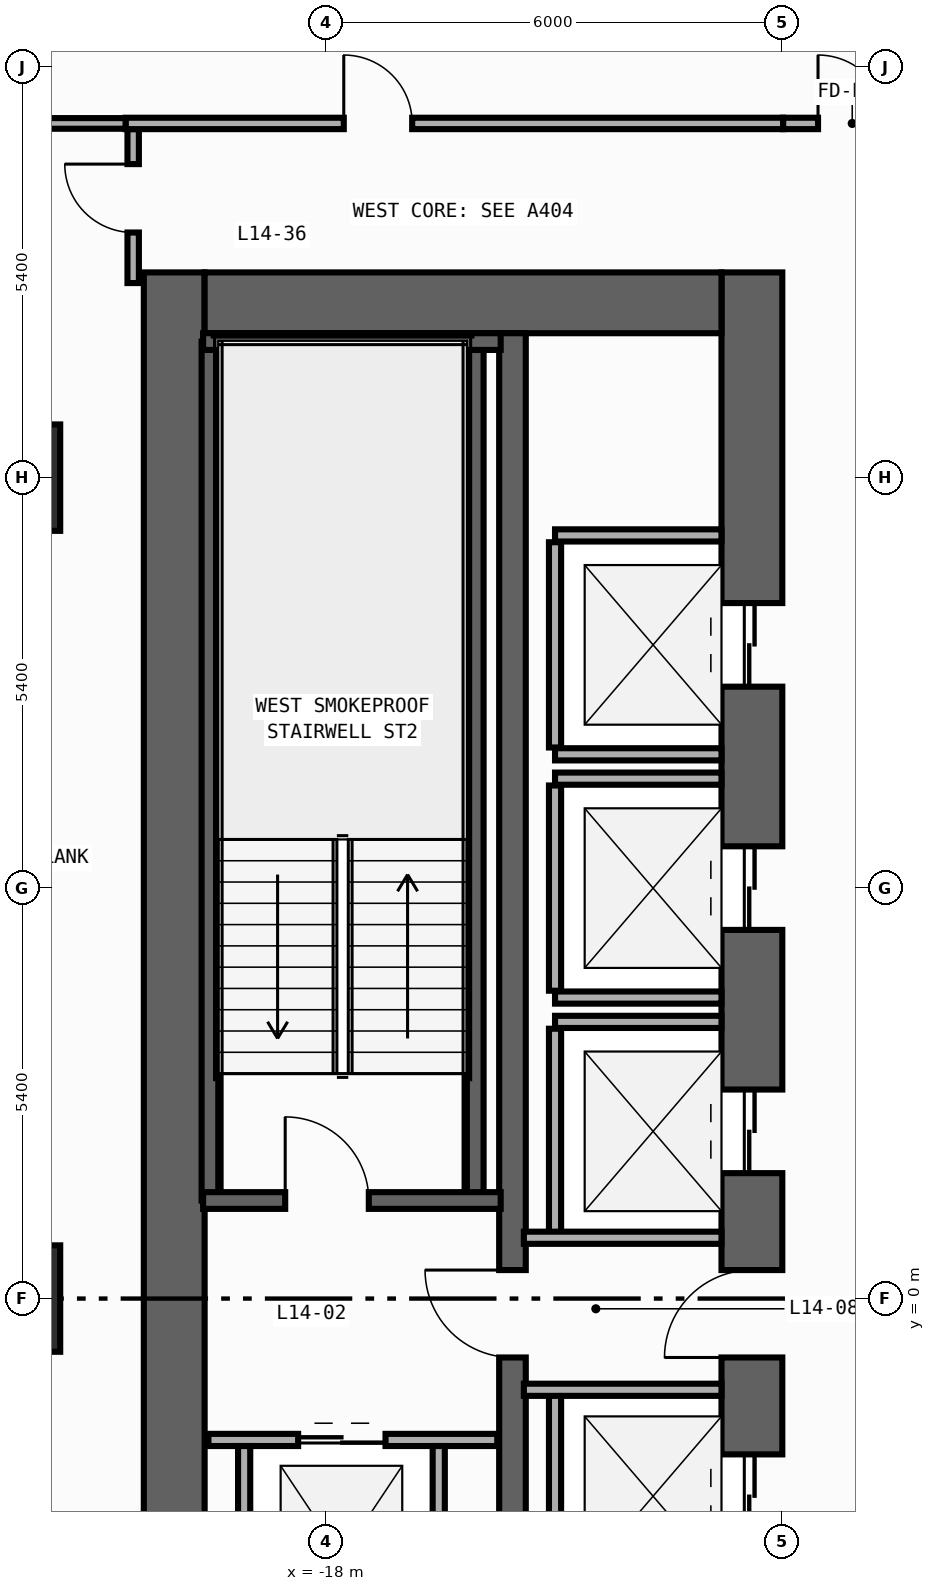
"""IFC4 building model, lengths in metres.
Left out: names, types, materials, properties, quantities, classifications, styles, units other than length and angle.
Written with IfcOpenShell. Run it as: python <this file> out.ifc"""

import sys

from ifc_helpers import new_model, si_unit, direction, frame, frame_2d, origin, origin_2d, place, context, subcontext, project, spatial, rectangle, extrude, element, fill, save


model = new_model("IFC4")
c1 = context("Model", 3, precision=1e-05, world=origin(), true_north=direction((0.0, 1.0)))
c2 = subcontext(c1, "Body", "Model", "MODEL_VIEW")
j1 = project(units=[si_unit("LENGTHUNIT", "METRE"), si_unit("PLANEANGLEUNIT", "RADIAN")], contexts=[c1])
p1 = place(None, origin())
s1 = spatial("IfcSite", under=j1, at=p1, CompositionType="ELEMENT")
p2 = place(p1, origin())
s2 = spatial("IfcBuilding", under=s1, at=p2, CompositionType="ELEMENT")
p3 = place(p2, frame((0.0, 0.0, 59.6)))
s3 = spatial("IfcBuildingStorey", under=s2, at=p3, CompositionType="ELEMENT", Elevation=59.6)
p4 = place(p3, frame((-20.0, -13.5, 0.0), z_axis=(0.0, 0.0, 1.0), x_axis=(0.0, 1.0, 0.0)))
e1 = element("IfcWall", 1, at=p4, inside=s3, PredefinedType="SHEAR", context=c2, shape_type="SweptSolid", body=[
    extrude(rectangle(XDim=27.0, YDim=0.8, at=frame_2d((13.5, 0.0))), origin(), (0.0, 0.0, 1.0), 3.94),
])
p5 = place(p3, frame((-12.4, -13.5, 0.0), z_axis=(0.0, 0.0, 1.0), x_axis=(0.0, 1.0, 0.0)))
e2 = element("IfcWall", 2, at=p5, inside=s3, PredefinedType="SHEAR", context=c2, shape_type="SweptSolid", body=[
    extrude(rectangle(XDim=27.0, YDim=0.8, at=frame_2d((13.5, 0.0))), origin(), (0.0, 0.0, 1.0), 3.94),
])
p6 = place(p5, frame((21.55, 0.0, 0.0)))
e3 = element("IfcOpeningElement", 3, at=p6, cuts=e2, PredefinedType="OPENING", context=c2, shape_type="SweptSolid", body=[
    extrude(rectangle(XDim=1.1, YDim=2.2, at=frame_2d((0.55, 1.1))), frame((0.0, 0.41, 0.0), z_axis=(0.0, -1.0, 0.0), x_axis=(1.0, 0.0, 0.0)), (0.0, 0.0, 1.0), 0.82),
])
p7 = place(p5, frame((18.35, 0.0, 0.0)))
e4 = element("IfcOpeningElement", 4, at=p7, cuts=e2, PredefinedType="OPENING", context=c2, shape_type="SweptSolid", body=[
    extrude(rectangle(XDim=1.1, YDim=2.2, at=frame_2d((0.55, 1.1))), frame((0.0, 0.41, 0.0), z_axis=(0.0, -1.0, 0.0), x_axis=(1.0, 0.0, 0.0)), (0.0, 0.0, 1.0), 0.82),
])
p8 = place(p5, frame((15.15, 0.0, 0.0)))
e5 = element("IfcOpeningElement", 5, at=p8, cuts=e2, PredefinedType="OPENING", context=c2, shape_type="SweptSolid", body=[
    extrude(rectangle(XDim=1.1, YDim=2.2, at=frame_2d((0.55, 1.1))), frame((0.0, 0.41, 0.0), z_axis=(0.0, -1.0, 0.0), x_axis=(1.0, 0.0, 0.0)), (0.0, 0.0, 1.0), 0.82),
])
p9 = place(p5, frame((10.35, 0.0, 0.0)))
e6 = element("IfcOpeningElement", 6, at=p9, cuts=e2, PredefinedType="OPENING", context=c2, shape_type="SweptSolid", body=[
    extrude(rectangle(XDim=1.1, YDim=2.2, at=frame_2d((0.55, 1.1))), frame((0.0, 0.41, 0.0), z_axis=(0.0, -1.0, 0.0), x_axis=(1.0, 0.0, 0.0)), (0.0, 0.0, 1.0), 0.82),
])
p10 = place(p5, frame((7.15, 0.0, 0.0)))
e7 = element("IfcOpeningElement", 7, at=p10, cuts=e2, PredefinedType="OPENING", context=c2, shape_type="SweptSolid", body=[
    extrude(rectangle(XDim=1.1, YDim=2.2, at=frame_2d((0.55, 1.1))), frame((0.0, 0.41, 0.0), z_axis=(0.0, -1.0, 0.0), x_axis=(1.0, 0.0, 0.0)), (0.0, 0.0, 1.0), 0.82),
])
p11 = place(p5, frame((3.95, 0.0, 0.0)))
e8 = element("IfcOpeningElement", 8, at=p11, cuts=e2, PredefinedType="OPENING", context=c2, shape_type="SweptSolid", body=[
    extrude(rectangle(XDim=1.1, YDim=2.2, at=frame_2d((0.55, 1.1))), frame((0.0, 0.41, 0.0), z_axis=(0.0, -1.0, 0.0), x_axis=(1.0, 0.0, 0.0)), (0.0, 0.0, 1.0), 0.82),
])
p12 = place(p5, frame((12.725, 0.0, 0.0)))
e9 = element("IfcOpeningElement", 9, at=p12, cuts=e2, PredefinedType="OPENING", context=c2, shape_type="SweptSolid", body=[
    extrude(rectangle(XDim=1.15, YDim=2.2, at=frame_2d((0.575, 1.1))), frame((0.0, 0.41, 0.0), z_axis=(0.0, -1.0, 0.0), x_axis=(1.0, 0.0, 0.0)), (0.0, 0.0, 1.0), 0.82),
])
p13 = place(p5, frame((1.625, 0.0, 0.0)))
e10 = element("IfcOpeningElement", 10, at=p13, cuts=e2, PredefinedType="OPENING", context=c2, shape_type="SweptSolid", body=[
    extrude(rectangle(XDim=0.85, YDim=2.1, at=frame_2d((0.425, 1.05))), frame((0.0, 0.41, 0.0), z_axis=(0.0, -1.0, 0.0), x_axis=(1.0, 0.0, 0.0)), (0.0, 0.0, 1.0), 0.82),
])
p14 = place(p3, frame((-19.6, 13.1, 0.0), z_axis=(0.0, 0.0, 1.0), x_axis=(1.0, 0.0, 0.0)))
e11 = element("IfcWall", 11, at=p14, inside=s3, PredefinedType="SHEAR", context=c2, shape_type="SweptSolid", body=[
    extrude(rectangle(XDim=6.8, YDim=0.8, at=frame_2d((3.4, 0.0))), origin(), (0.0, 0.0, 1.0), 3.94),
])
p15 = place(p3, frame((-15.55, -12.7, 0.0), z_axis=(0.0, 0.0, 1.0), x_axis=(0.0, 1.0, 0.0)))
e12 = element("IfcWall", 12, at=p15, inside=s3, PredefinedType="SHEAR", context=c2, shape_type="SweptSolid", body=[
    extrude(rectangle(XDim=25.4, YDim=0.35, at=frame_2d((12.7, 0.0))), origin(), (0.0, 0.0, 1.0), 3.94),
])
p16 = place(p15, frame((11.925, 0.0, 0.0)))
e13 = element("IfcOpeningElement", 13, at=p16, cuts=e12, PredefinedType="OPENING", context=c2, shape_type="SweptSolid", body=[
    extrude(rectangle(XDim=1.15, YDim=2.2, at=frame_2d((0.575, 1.1))), frame((0.0, 0.185, 0.0), z_axis=(0.0, -1.0, 0.0), x_axis=(1.0, 0.0, 0.0)), (0.0, 0.0, 1.0), 0.37),
])
p17 = place(p15, frame((0.825, 0.0, 0.0)))
e14 = element("IfcOpeningElement", 14, at=p17, cuts=e12, PredefinedType="OPENING", context=c2, shape_type="SweptSolid", body=[
    extrude(rectangle(XDim=0.85, YDim=2.1, at=frame_2d((0.425, 1.05))), frame((0.0, 0.185, 0.0), z_axis=(0.0, -1.0, 0.0), x_axis=(1.0, 0.0, 0.0)), (0.0, 0.0, 1.0), 0.37),
])
for number, where, z_axis, x_axis in (
    (15, (-16.04, 1.29, 0.0), (0.0, 0.0, 1.0), (0.0, 1.0, 0.0)),
    (16, (-19.53, 1.29, 0.0), (0.0, 0.0, 1.0), (0.0, 1.0, 0.0)),
):
    element("IfcWall", number, at=place(p3, frame(where, z_axis=z_axis, x_axis=x_axis)), inside=s3, PredefinedType="SHEAR", context=c2, shape_type="SweptSolid", body=[
        extrude(rectangle(XDim=11.3, YDim=0.22, at=frame_2d((5.65, 0.0))), origin(), (0.0, 0.0, 1.0), 3.94),
    ])
p18 = place(p3, frame((-19.62, 12.59, 0.0), z_axis=(0.0, 0.0, 1.0), x_axis=(1.0, 0.0, 0.0)))
e17 = element("IfcWall", 17, at=p18, inside=s3, PredefinedType="SHEAR", context=c2, shape_type="SweptSolid", body=[
    extrude(rectangle(XDim=3.915, YDim=0.22, at=frame_2d((1.958, 0.0))), origin(), (0.0, 0.0, 1.0), 3.94),
])
p19 = place(p3, frame((-19.62, 1.29, 0.0), z_axis=(0.0, 0.0, 1.0), x_axis=(1.0, 0.0, 0.0)))
e18 = element("IfcWall", 18, at=p19, inside=s3, PredefinedType="SHEAR", context=c2, shape_type="SweptSolid", body=[
    extrude(rectangle(XDim=3.915, YDim=0.22, at=frame_2d((1.958, 0.0))), origin(), (0.0, 0.0, 1.0), 3.94),
])
p20 = place(p19, frame((1.08, 0.0, 0.0)))
e19 = element("IfcOpeningElement", 19, at=p20, cuts=e18, PredefinedType="OPENING", context=c2, shape_type="SweptSolid", body=[
    extrude(rectangle(XDim=1.1, YDim=2.2, at=frame_2d((0.55, 1.1))), frame((0.0, 0.12, 0.0), z_axis=(0.0, -1.0, 0.0), x_axis=(1.0, 0.0, 0.0)), (0.0, 0.0, 1.0), 0.24),
])
for number, where, z_axis, x_axis in (
    (20, (-22.2, 0.0, 0.0), (0.0, 0.0, 1.0), (1.0, 0.0, 0.0)),
    (21, (-22.2, 10.8, 0.0), (0.0, 0.0, 1.0), (1.0, 0.0, 0.0)),
):
    element("IfcColumn", number, at=place(p3, frame(where, z_axis=z_axis, x_axis=x_axis)), inside=s3, PredefinedType="COLUMN", context=c2, shape_type="SweptSolid", body=[
        extrude(rectangle(XDim=1.4, YDim=1.4, at=origin_2d()), origin(), (0.0, 0.0, 1.0), 4.2),
    ])
for number, where, z_axis, x_axis in (
    (22, (-14.99, 7.16, 0.0), (0.0, 0.0, 1.0), (1.0, 0.0, 0.0)),
    (23, (-14.99, 10.04, 0.0), (0.0, 0.0, 1.0), (1.0, 0.0, 0.0)),
):
    element("IfcWall", number, at=place(p3, frame(where, z_axis=z_axis, x_axis=x_axis)), inside=s3, PredefinedType="STANDARD", context=c2, shape_type="SweptSolid", body=[
        extrude(rectangle(XDim=2.19, YDim=0.16, at=frame_2d((1.095, 0.0))), origin(), (0.0, 0.0, 1.0), 3.94),
    ])
p21 = place(p3, frame((-14.99, 7.25, 0.0), z_axis=(0.0, 0.0, 1.0), x_axis=(0.0, 1.0, 0.0)))
e24 = element("IfcWall", 24, at=p21, inside=s3, PredefinedType="STANDARD", context=c2, shape_type="SweptSolid", body=[
    extrude(rectangle(XDim=2.7, YDim=0.16, at=frame_2d((1.35, 0.0))), origin(), (0.0, 0.0, 1.0), 3.94),
])
for number, where, z_axis, x_axis in (
    (25, (-14.99, 3.96, 0.0), (0.0, 0.0, 1.0), (1.0, 0.0, 0.0)),
    (26, (-14.99, 6.84, 0.0), (0.0, 0.0, 1.0), (1.0, 0.0, 0.0)),
):
    element("IfcWall", number, at=place(p3, frame(where, z_axis=z_axis, x_axis=x_axis)), inside=s3, PredefinedType="STANDARD", context=c2, shape_type="SweptSolid", body=[
        extrude(rectangle(XDim=2.19, YDim=0.16, at=frame_2d((1.095, 0.0))), origin(), (0.0, 0.0, 1.0), 3.94),
    ])
p22 = place(p3, frame((-14.99, 4.05, 0.0), z_axis=(0.0, 0.0, 1.0), x_axis=(0.0, 1.0, 0.0)))
e27 = element("IfcWall", 27, at=p22, inside=s3, PredefinedType="STANDARD", context=c2, shape_type="SweptSolid", body=[
    extrude(rectangle(XDim=2.7, YDim=0.16, at=frame_2d((1.35, 0.0))), origin(), (0.0, 0.0, 1.0), 3.94),
])
p23 = place(p3, frame((-14.99, 3.64, 0.0), z_axis=(0.0, 0.0, 1.0), x_axis=(1.0, 0.0, 0.0)))
e28 = element("IfcWall", 28, at=p23, inside=s3, PredefinedType="STANDARD", context=c2, shape_type="SweptSolid", body=[
    extrude(rectangle(XDim=2.19, YDim=0.16, at=frame_2d((1.095, 0.0))), origin(), (0.0, 0.0, 1.0), 3.94),
])
for number, where, z_axis, x_axis in (
    (29, (-14.99, 0.85, 0.0), (0.0, 0.0, 1.0), (0.0, 1.0, 0.0)),
    (30, (-14.99, -3.95, 0.0), (0.0, 0.0, 1.0), (0.0, 1.0, 0.0)),
):
    element("IfcWall", number, at=place(p3, frame(where, z_axis=z_axis, x_axis=x_axis)), inside=s3, PredefinedType="STANDARD", context=c2, shape_type="SweptSolid", body=[
        extrude(rectangle(XDim=2.7, YDim=0.16, at=frame_2d((1.35, 0.0))), origin(), (0.0, 0.0, 1.0), 3.94),
    ])
p24 = place(p3, frame((-19.55, -1.86, 0.0), z_axis=(0.0, 0.0, 1.0), x_axis=(1.0, 0.0, 0.0)))
e31 = element("IfcWall", 31, at=p24, inside=s3, PredefinedType="STANDARD", context=c2, shape_type="SweptSolid", body=[
    extrude(rectangle(XDim=3.8, YDim=0.16, at=frame_2d((1.9, 0.0))), origin(), (0.0, 0.0, 1.0), 3.94),
])
p25 = place(p24, frame((1.18, 0.0, 0.0)))
e32 = element("IfcOpeningElement", 32, at=p25, cuts=e31, PredefinedType="OPENING", context=c2, shape_type="SweptSolid", body=[
    extrude(rectangle(XDim=1.15, YDim=2.2, at=frame_2d((0.575, 1.1))), frame((0.0, 0.09, 0.0), z_axis=(0.0, -1.0, 0.0), x_axis=(1.0, 0.0, 0.0)), (0.0, 0.0, 1.0), 0.18),
])
for number, where, z_axis, x_axis in (
    (33, (-19.08, -4.9, 0.0), (0.0, 0.0, 1.0), (0.0, 1.0, 0.0)),
    (34, (-16.52, -4.9, 0.0), (0.0, 0.0, 1.0), (0.0, 1.0, 0.0)),
):
    element("IfcWall", number, at=place(p3, frame(where, z_axis=z_axis, x_axis=x_axis)), inside=s3, PredefinedType="STANDARD", context=c2, shape_type="SweptSolid", body=[
        extrude(rectangle(XDim=2.96, YDim=0.16, at=frame_2d((1.48, 0.0))), origin(), (0.0, 0.0, 1.0), 3.94),
    ])
for number, where, z_axis, x_axis in (
    (35, (-15.4, 0.8, 0.0), (0.0, 0.0, 1.0), (1.0, 0.0, 0.0)),
    (36, (-15.4, -1.2, 0.0), (0.0, 0.0, 1.0), (1.0, 0.0, 0.0)),
):
    element("IfcWall", number, at=place(p3, frame(where, z_axis=z_axis, x_axis=x_axis)), inside=s3, PredefinedType="STANDARD", context=c2, shape_type="SweptSolid", body=[
        extrude(rectangle(XDim=2.6, YDim=0.16, at=frame_2d((1.3, 0.0))), origin(), (0.0, 0.0, 1.0), 3.94),
    ])
p26 = place(p3, frame((-11.99, 15.46, 0.0), z_axis=(0.0, 0.0, 1.0), x_axis=(1.0, 0.0, 0.0)))
e37 = element("IfcWall", 37, at=p26, inside=s3, PredefinedType="PARTITIONING", context=c2, shape_type="SweptSolid", body=[
    extrude(rectangle(XDim=1.98, YDim=0.15, at=frame_2d((0.99, 0.0))), origin(), (0.0, 0.0, 1.0), 3.94),
])
p27 = place(p26, frame((0.46, 0.0, 0.0)))
e38 = element("IfcOpeningElement", 38, at=p27, cuts=e37, PredefinedType="OPENING", context=c2, shape_type="SweptSolid", body=[
    extrude(rectangle(XDim=0.9, YDim=2.15, at=frame_2d((0.45, 1.075))), frame((0.0, 0.085, 0.0), z_axis=(0.0, -1.0, 0.0), x_axis=(1.0, 0.0, 0.0)), (0.0, 0.0, 1.0), 0.17),
])
p28 = place(p3, frame((-20.54, 13.36, 0.0), z_axis=(0.0, 0.0, 1.0), x_axis=(0.0, 1.0, 0.0)))
e39 = element("IfcWall", 39, at=p28, inside=s3, PredefinedType="PARTITIONING", context=c2, shape_type="SweptSolid", body=[
    extrude(rectangle(XDim=2.025, YDim=0.15, at=frame_2d((1.012, 0.0))), origin(), (0.0, 0.0, 1.0), 3.94),
])
p29 = place(p28, frame((0.665, 0.0, 0.0)))
e40 = element("IfcOpeningElement", 40, at=p29, cuts=e39, PredefinedType="OPENING", context=c2, shape_type="SweptSolid", body=[
    extrude(rectangle(XDim=0.9, YDim=2.15, at=frame_2d((0.45, 1.075))), frame((0.0, 0.085, 0.0), z_axis=(0.0, -1.0, 0.0), x_axis=(1.0, 0.0, 0.0)), (0.0, 0.0, 1.0), 0.17),
])
p30 = place(p3, frame((-20.64, 15.46, 0.0), z_axis=(0.0, 0.0, 1.0), x_axis=(1.0, 0.0, 0.0)))
e41 = element("IfcWall", 41, at=p30, inside=s3, PredefinedType="PARTITIONING", context=c2, shape_type="SweptSolid", body=[
    extrude(rectangle(XDim=8.65, YDim=0.15, at=frame_2d((4.325, 0.0))), origin(), (0.0, 0.0, 1.0), 3.94),
])
p31 = place(p30, frame((2.871, 0.0, 0.0)))
e42 = element("IfcOpeningElement", 42, at=p31, cuts=e41, PredefinedType="OPENING", context=c2, shape_type="SweptSolid", body=[
    extrude(rectangle(XDim=0.9, YDim=2.15, at=frame_2d((0.45, 1.075))), frame((0.0, 0.085, 0.0), z_axis=(0.0, -1.0, 0.0), x_axis=(1.0, 0.0, 0.0)), (0.0, 0.0, 1.0), 0.17),
])
p32 = place(p3, frame((-24.055, 15.46, 0.0), z_axis=(0.0, 0.0, 1.0), x_axis=(1.0, 0.0, 0.0)))
e43 = element("IfcWall", 43, at=p32, inside=s3, PredefinedType="PARTITIONING", context=c2, shape_type="SweptSolid", body=[
    extrude(rectangle(XDim=3.415, YDim=0.14, at=frame_2d((1.708, 0.0))), origin(), (0.0, 0.0, 1.0), 3.94),
])
p33 = place(p20, origin())
e44 = element("IfcDoor", 44, at=p33, inside=s3, OperationType="SINGLE_SWING_LEFT", PredefinedType="DOOR", context=c2, shape_type="SweptSolid", body=[
    extrude(rectangle(XDim=1.1, YDim=2.2, at=frame_2d((0.55, 1.1))), frame((0.0, 0.025, 0.0), z_axis=(0.0, -1.0, 0.0), x_axis=(1.0, 0.0, 0.0)), (0.0, 0.0, 1.0), 0.05),
])
fill(e19, e44)
p34 = place(p6, origin())
e45 = element("IfcDoor", 45, at=p34, inside=s3, OperationType="DOUBLE_DOOR_SLIDING", PredefinedType="DOOR", context=c2, shape_type="SweptSolid", body=[
    extrude(rectangle(XDim=1.1, YDim=2.2, at=frame_2d((0.55, 1.1))), frame((0.0, 0.025, 0.0), z_axis=(0.0, -1.0, 0.0), x_axis=(1.0, 0.0, 0.0)), (0.0, 0.0, 1.0), 0.05),
])
fill(e3, e45)
p35 = place(p7, origin())
e46 = element("IfcDoor", 46, at=p35, inside=s3, OperationType="DOUBLE_DOOR_SLIDING", PredefinedType="DOOR", context=c2, shape_type="SweptSolid", body=[
    extrude(rectangle(XDim=1.1, YDim=2.2, at=frame_2d((0.55, 1.1))), frame((0.0, 0.025, 0.0), z_axis=(0.0, -1.0, 0.0), x_axis=(1.0, 0.0, 0.0)), (0.0, 0.0, 1.0), 0.05),
])
fill(e4, e46)
p36 = place(p8, origin())
e47 = element("IfcDoor", 47, at=p36, inside=s3, OperationType="DOUBLE_DOOR_SLIDING", PredefinedType="DOOR", context=c2, shape_type="SweptSolid", body=[
    extrude(rectangle(XDim=1.1, YDim=2.2, at=frame_2d((0.55, 1.1))), frame((0.0, 0.025, 0.0), z_axis=(0.0, -1.0, 0.0), x_axis=(1.0, 0.0, 0.0)), (0.0, 0.0, 1.0), 0.05),
])
fill(e5, e47)
p37 = place(p9, origin())
e48 = element("IfcDoor", 48, at=p37, inside=s3, OperationType="DOUBLE_DOOR_SLIDING", PredefinedType="DOOR", context=c2, shape_type="SweptSolid", body=[
    extrude(rectangle(XDim=1.1, YDim=2.2, at=frame_2d((0.55, 1.1))), frame((0.0, 0.025, 0.0), z_axis=(0.0, -1.0, 0.0), x_axis=(1.0, 0.0, 0.0)), (0.0, 0.0, 1.0), 0.05),
])
fill(e6, e48)
p38 = place(p12, origin())
e49 = element("IfcDoor", 49, at=p38, inside=s3, OperationType="SINGLE_SWING_LEFT", PredefinedType="DOOR", context=c2, shape_type="SweptSolid", body=[
    extrude(rectangle(XDim=1.15, YDim=2.2, at=frame_2d((0.575, 1.1))), frame((0.0, 0.025, 0.0), z_axis=(0.0, -1.0, 0.0), x_axis=(1.0, 0.0, 0.0)), (0.0, 0.0, 1.0), 0.05),
])
fill(e9, e49)
p39 = place(p16, origin())
e50 = element("IfcDoor", 50, at=p39, inside=s3, OperationType="SINGLE_SWING_RIGHT", PredefinedType="DOOR", context=c2, shape_type="SweptSolid", body=[
    extrude(rectangle(XDim=1.15, YDim=2.2, at=frame_2d((0.575, 1.1))), frame((0.0, 0.025, 0.0), z_axis=(0.0, -1.0, 0.0), x_axis=(1.0, 0.0, 0.0)), (0.0, 0.0, 1.0), 0.05),
])
fill(e13, e50)
p40 = place(p25, origin())
e51 = element("IfcDoor", 51, at=p40, inside=s3, OperationType="DOUBLE_DOOR_SLIDING", PredefinedType="DOOR", context=c2, shape_type="SweptSolid", body=[
    extrude(rectangle(XDim=1.15, YDim=2.2, at=frame_2d((0.575, 1.1))), frame((0.0, 0.025, 0.0), z_axis=(0.0, -1.0, 0.0), x_axis=(1.0, 0.0, 0.0)), (0.0, 0.0, 1.0), 0.05),
])
fill(e32, e51)
p41 = place(p27, origin())
e52 = element("IfcDoor", 52, at=p41, inside=s3, OperationType="SINGLE_SWING_LEFT", PredefinedType="DOOR", context=c2, shape_type="SweptSolid", body=[
    extrude(rectangle(XDim=0.9, YDim=2.15, at=frame_2d((0.45, 1.075))), frame((0.0, 0.025, 0.0), z_axis=(0.0, -1.0, 0.0), x_axis=(1.0, 0.0, 0.0)), (0.0, 0.0, 1.0), 0.05),
])
fill(e38, e52)
p42 = place(p29, origin())
e53 = element("IfcDoor", 53, at=p42, inside=s3, OperationType="SINGLE_SWING_RIGHT", PredefinedType="DOOR", context=c2, shape_type="SweptSolid", body=[
    extrude(rectangle(XDim=0.9, YDim=2.15, at=frame_2d((0.45, 1.075))), frame((0.0, 0.025, 0.0), z_axis=(0.0, -1.0, 0.0), x_axis=(1.0, 0.0, 0.0)), (0.0, 0.0, 1.0), 0.05),
])
fill(e40, e53)
p43 = place(p31, origin())
e54 = element("IfcDoor", 54, at=p43, inside=s3, OperationType="SINGLE_SWING_LEFT", PredefinedType="DOOR", context=c2, shape_type="SweptSolid", body=[
    extrude(rectangle(XDim=0.9, YDim=2.15, at=frame_2d((0.45, 1.075))), frame((0.0, 0.025, 0.0), z_axis=(0.0, -1.0, 0.0), x_axis=(1.0, 0.0, 0.0)), (0.0, 0.0, 1.0), 0.05),
])
fill(e42, e54)
save(model, sys.argv[1])
